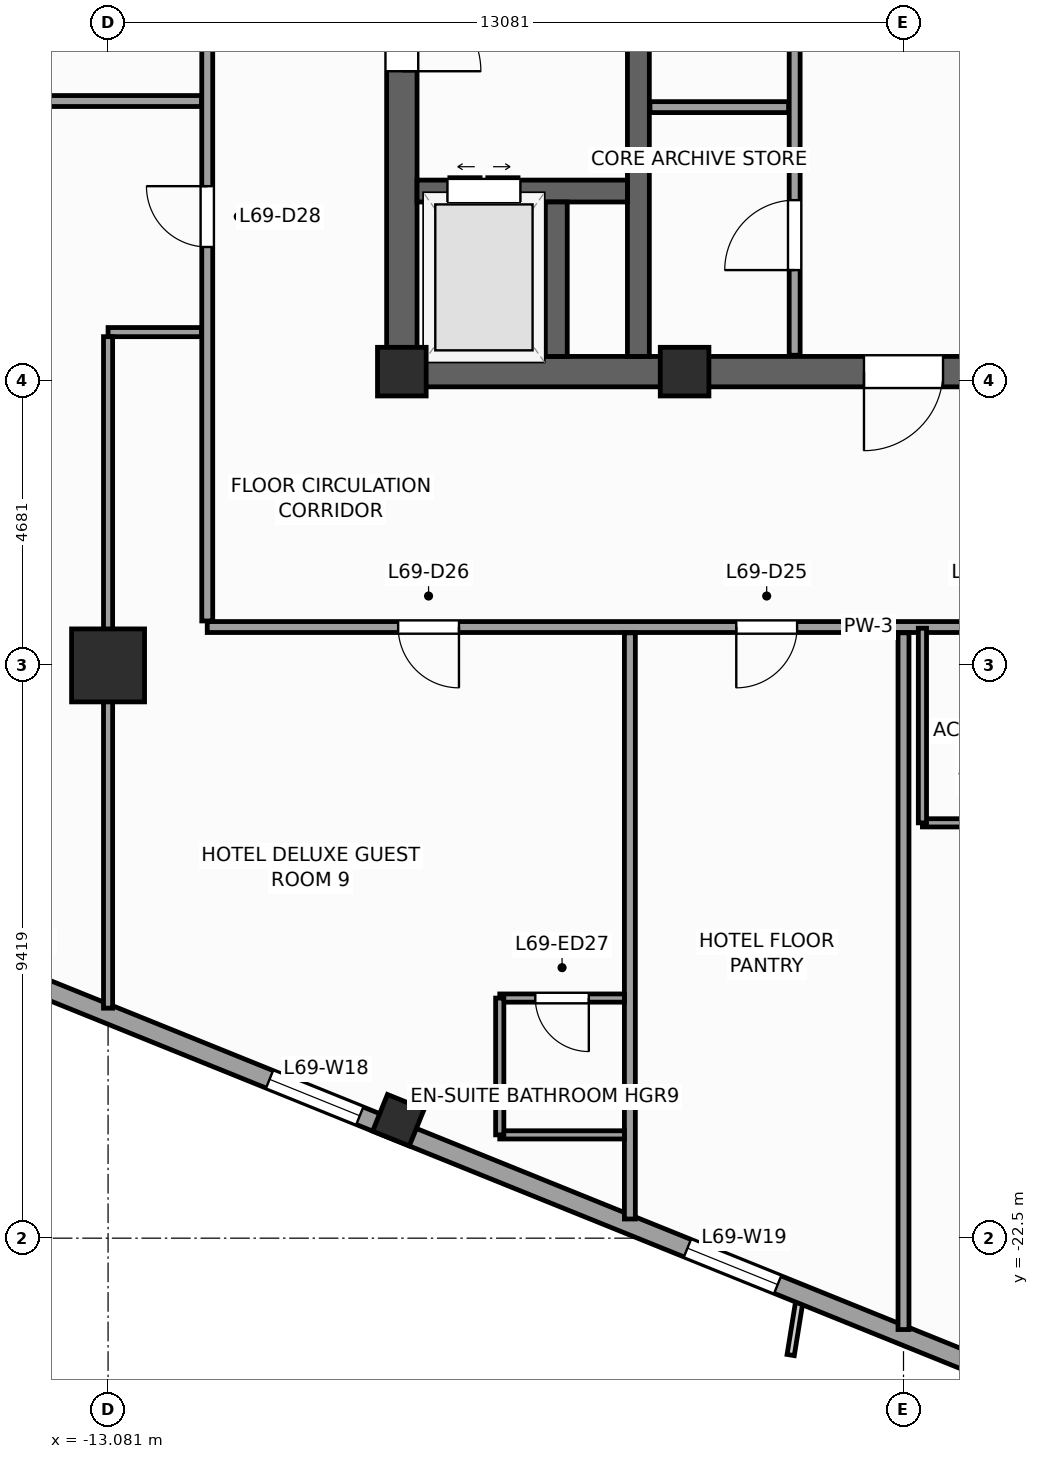
"""IFC4 building model, lengths in metres.
Left out: names, types, materials, properties, quantities, classifications, styles, units other than length and angle.
Written with IfcOpenShell. Run it as: python <this file> out.ifc"""

import sys

from ifc_helpers import new_model, si_unit, direction, frame, frame_2d, origin, origin_2d, place, context, subcontext, project, spatial, rectangle, extrude, source, transform, mapped, element, fill, save


model = new_model("IFC4")
c1 = context("Model", 3, precision=1e-05, world=origin(), true_north=direction((0.0, 1.0)))
c2 = subcontext(c1, "Body", "Model", "MODEL_VIEW")
j1 = project(units=[si_unit("LENGTHUNIT", "METRE"), si_unit("PLANEANGLEUNIT", "RADIAN")], contexts=[c1])
p1 = place(None, origin())
s1 = spatial("IfcSite", under=j1, at=p1, CompositionType="ELEMENT")
p2 = place(p1, origin())
s2 = spatial("IfcBuilding", under=s1, at=p2, CompositionType="ELEMENT")
p3 = place(p2, frame((0.0, 0.0, 283.2)))
s3 = spatial("IfcBuildingStorey", under=s2, at=p3, CompositionType="ELEMENT", Elevation=283.2)
p4 = place(p3, frame((-8.5, -8.25, 0.0), z_axis=(0.0, 0.0, 1.0), x_axis=(1.0, 0.0, 0.0)))
e1 = element("IfcWall", 1, at=p4, inside=s3, PredefinedType="SHEAR", context=c2, shape_type="SweptSolid", body=[
    extrude(rectangle(XDim=17.0, YDim=0.5, at=frame_2d((8.5, 0.0))), origin(), (0.0, 0.0, 1.0), 3.6),
])
p5 = place(p4, frame((7.85, 0.0, 0.0)))
e2 = element("IfcOpeningElement", 2, at=p5, cuts=e1, PredefinedType="OPENING", context=c2, shape_type="SweptSolid", body=[
    extrude(rectangle(XDim=1.3, YDim=2.2, at=frame_2d((0.65, 1.1))), frame((0.0, 0.26, 0.0), z_axis=(0.0, -1.0, 0.0), x_axis=(1.0, 0.0, 0.0)), (0.0, 0.0, 1.0), 0.52),
])
p6 = place(p3, frame((-8.25, -8.0, 0.0), z_axis=(0.0, 0.0, 1.0), x_axis=(0.0, 1.0, 0.0)))
e3 = element("IfcWall", 3, at=p6, inside=s3, PredefinedType="SHEAR", context=c2, shape_type="SweptSolid", body=[
    extrude(rectangle(XDim=16.0, YDim=0.5, at=frame_2d((8.0, 0.0))), origin(), (0.0, 0.0, 1.0), 3.6),
])
p7 = place(p6, frame((4.69, 0.0, 0.0)))
e4 = element("IfcOpeningElement", 4, at=p7, cuts=e3, PredefinedType="OPENING", context=c2, shape_type="SweptSolid", body=[
    extrude(rectangle(XDim=1.3, YDim=2.2, at=frame_2d((0.65, 1.1))), frame((0.0, 0.26, 0.0), z_axis=(0.0, -1.0, 0.0), x_axis=(1.0, 0.0, 0.0)), (0.0, 0.0, 1.0), 0.52),
])
p8 = place(p3, frame((-4.36, -8.0, 0.0), z_axis=(0.0, 0.0, 1.0), x_axis=(0.0, 1.0, 0.0)))
e5 = element("IfcWall", 5, at=p8, inside=s3, PredefinedType="SHEAR", context=c2, shape_type="SweptSolid", body=[
    extrude(rectangle(XDim=16.0, YDim=0.36, at=frame_2d((8.0, 0.0))), origin(), (0.0, 0.0, 1.0), 3.6),
])
p9 = place(p3, frame((-8.0, -5.28, 0.0), z_axis=(0.0, 0.0, 1.0), x_axis=(1.0, 0.0, 0.0)))
e6 = element("IfcWall", 6, at=p9, inside=s3, PredefinedType="SHEAR", context=c2, shape_type="SweptSolid", body=[
    extrude(rectangle(XDim=3.46, YDim=0.36, at=frame_2d((1.73, 0.0))), origin(), (0.0, 0.0, 1.0), 3.6),
])
p10 = place(p9, frame((0.5, 0.0, 0.0)))
e7 = element("IfcOpeningElement", 7, at=p10, cuts=e6, PredefinedType="OPENING", context=c2, shape_type="SweptSolid", body=[
    extrude(rectangle(XDim=1.2, YDim=2.25, at=frame_2d((0.6, 1.125))), frame((0.0, 0.19, 0.0), z_axis=(0.0, -1.0, 0.0), x_axis=(1.0, 0.0, 0.0)), (0.0, 0.0, 1.0), 0.38),
])
p11 = place(p3, frame((-5.71, -8.0, 0.0), z_axis=(0.0, 0.0, 1.0), x_axis=(0.0, 1.0, 0.0)))
e8 = element("IfcWall", 8, at=p11, inside=s3, PredefinedType="SHEAR", context=c2, shape_type="SweptSolid", body=[
    extrude(rectangle(XDim=2.54, YDim=0.36, at=frame_2d((1.27, 0.0))), origin(), (0.0, 0.0, 1.0), 3.6),
])
m1 = source(origin(), c2, "Body", "SweptSolid", [
    extrude(rectangle(XDim=0.8, YDim=0.8, at=origin_2d()), origin(), (0.0, 0.0, 1.0), 3.6),
])
for number, where, z_axis, x_axis in (
    (9, (-8.25, -8.25, 0.0), (0.0, 0.0, 1.0), (1.0, 0.0, 0.0)),
    (10, (-3.6, -8.25, 0.0), (0.0, 0.0, 1.0), (1.0, 0.0, 0.0)),
):
    element("IfcColumn", number, at=place(p3, frame(where, z_axis=z_axis, x_axis=x_axis)), inside=s3, PredefinedType="PILASTER", context=c2, shape_type="MappedRepresentation", body=[
        mapped(m1, transform((0.0, 0.0, 0.0), scale=1.0)),
    ])
m2 = source(origin(), c2, "Body", "SweptSolid", [
    extrude(rectangle(XDim=1.2, YDim=1.2, at=origin_2d()), origin(), (0.0, 0.0, 1.0), 3.6),
])
p12 = place(p3, frame((-13.081, -13.081, 0.0), z_axis=(0.0, 0.0, 1.0), x_axis=(1.0, 0.0, 0.0)))
e11 = element("IfcColumn", 11, at=p12, inside=s3, PredefinedType="COLUMN", context=c2, shape_type="MappedRepresentation", body=[
    mapped(m2, transform((0.0, 0.0, 0.0), scale=1.0)),
])
m3 = source(origin(), c2, "Body", "SweptSolid", [
    extrude(rectangle(XDim=0.65, YDim=0.65, at=origin_2d()), origin(), (0.0, 0.0, 1.0), 3.6),
])
p13 = place(p3, frame((-8.307, -20.56, 0.0), z_axis=(0.0, 0.0, 1.0), x_axis=(0.374606593416, 0.927183854567, 0.0)))
e12 = element("IfcColumn", 12, at=p13, inside=s3, PredefinedType="COLUMN", context=c2, shape_type="MappedRepresentation", body=[
    mapped(m3, transform((0.0, 0.0, 0.0), scale=1.0)),
])
p14 = place(p3, frame((-23.813, -14.479, 0.0), z_axis=(0.0, 0.0, 1.0), x_axis=(0.927182657188, -0.374609557019, 0.0)))
e13 = element("IfcWall", 13, at=p14, inside=s3, PredefinedType="STANDARD", context=c2, shape_type="SweptSolid", body=[
    extrude(rectangle(XDim=33.31, YDim=0.31, at=frame_2d((16.655, 0.0))), origin(), (0.0, 0.0, 1.0), 2.75),
])
p15 = place(p14, frame((3.197, 0.0, 0.47)))
e14 = element("IfcOpeningElement", 14, at=p15, cuts=e13, PredefinedType="OPENING", context=c2, shape_type="SweptSolid", body=[
    extrude(rectangle(XDim=1.6, YDim=2.1, at=frame_2d((0.8, 1.05))), frame((0.0, 0.165, 0.0), z_axis=(0.0, -1.0, 0.0), x_axis=(1.0, 0.0, 0.0)), (0.0, 0.0, 1.0), 0.33),
])
p16 = place(p14, frame((8.86, 0.0, 0.47)))
e15 = element("IfcOpeningElement", 15, at=p16, cuts=e13, PredefinedType="OPENING", context=c2, shape_type="SweptSolid", body=[
    extrude(rectangle(XDim=1.6, YDim=2.1, at=frame_2d((0.8, 1.05))), frame((0.0, 0.165, 0.0), z_axis=(0.0, -1.0, 0.0), x_axis=(1.0, 0.0, 0.0)), (0.0, 0.0, 1.0), 0.33),
])
p17 = place(p14, frame((14.439, 0.0, 0.47)))
e16 = element("IfcOpeningElement", 16, at=p17, cuts=e13, PredefinedType="OPENING", context=c2, shape_type="SweptSolid", body=[
    extrude(rectangle(XDim=1.6, YDim=2.1, at=frame_2d((0.8, 1.05))), frame((0.0, 0.165, 0.0), z_axis=(0.0, -1.0, 0.0), x_axis=(1.0, 0.0, 0.0)), (0.0, 0.0, 1.0), 0.33),
])
p18 = place(p14, frame((21.851, 0.0, 0.47)))
e17 = element("IfcOpeningElement", 17, at=p18, cuts=e13, PredefinedType="OPENING", context=c2, shape_type="SweptSolid", body=[
    extrude(rectangle(XDim=1.6, YDim=2.1, at=frame_2d((0.8, 1.05))), frame((0.0, 0.165, 0.0), z_axis=(0.0, -1.0, 0.0), x_axis=(1.0, 0.0, 0.0)), (0.0, 0.0, 1.0), 0.33),
])
p19 = place(p14, frame((27.847, 0.0, 0.47)))
e18 = element("IfcOpeningElement", 18, at=p19, cuts=e13, PredefinedType="OPENING", context=c2, shape_type="SweptSolid", body=[
    extrude(rectangle(XDim=1.6, YDim=2.1, at=frame_2d((0.8, 1.05))), frame((0.0, 0.165, 0.0), z_axis=(0.0, -1.0, 0.0), x_axis=(1.0, 0.0, 0.0)), (0.0, 0.0, 1.0), 0.33),
])
p20 = place(p3, frame((-1.79, -7.98, 0.0), z_axis=(0.0, 0.0, 1.0), x_axis=(0.0, 1.0, 0.0)))
e19 = element("IfcWall", 19, at=p20, inside=s3, PredefinedType="PARTITIONING", context=c2, shape_type="SweptSolid", body=[
    extrude(rectangle(XDim=12.38, YDim=0.18, at=frame_2d((6.19, 0.0))), origin(), (0.0, 0.0, 1.0), 3.35),
])
p21 = place(p20, frame((8.8, 0.0, 0.0)))
e20 = element("IfcOpeningElement", 20, at=p21, cuts=e19, PredefinedType="OPENING", context=c2, shape_type="SweptSolid", body=[
    extrude(rectangle(XDim=1.1, YDim=2.2, at=frame_2d((0.55, 1.1))), frame((0.0, 0.1, 0.0), z_axis=(0.0, -1.0, 0.0), x_axis=(1.0, 0.0, 0.0)), (0.0, 0.0, 1.0), 0.2),
])
p22 = place(p20, frame((10.86, 0.0, 0.0)))
e21 = element("IfcOpeningElement", 21, at=p22, cuts=e19, PredefinedType="OPENING", context=c2, shape_type="SweptSolid", body=[
    extrude(rectangle(XDim=1.1, YDim=2.2, at=frame_2d((0.55, 1.1))), frame((0.0, 0.1, 0.0), z_axis=(0.0, -1.0, 0.0), x_axis=(1.0, 0.0, 0.0)), (0.0, 0.0, 1.0), 0.2),
])
p23 = place(p20, frame((1.4, 0.0, 0.0)))
e22 = element("IfcOpeningElement", 22, at=p23, cuts=e19, PredefinedType="OPENING", context=c2, shape_type="SweptSolid", body=[
    extrude(rectangle(XDim=1.15, YDim=2.25, at=frame_2d((0.575, 1.125))), frame((0.0, 0.1, 0.0), z_axis=(0.0, -1.0, 0.0), x_axis=(1.0, 0.0, 0.0)), (0.0, 0.0, 1.0), 0.2),
])
p24 = place(p20, frame((5.6, 0.0, 0.0)))
e23 = element("IfcOpeningElement", 23, at=p24, cuts=e19, PredefinedType="OPENING", context=c2, shape_type="SweptSolid", body=[
    extrude(rectangle(XDim=1.15, YDim=2.25, at=frame_2d((0.575, 1.125))), frame((0.0, 0.1, 0.0), z_axis=(0.0, -1.0, 0.0), x_axis=(1.0, 0.0, 0.0)), (0.0, 0.0, 1.0), 0.2),
])
p25 = place(p3, frame((-4.17, -3.9, 0.0), z_axis=(0.0, 0.0, 1.0), x_axis=(1.0, 0.0, 0.0)))
e24 = element("IfcWall", 24, at=p25, inside=s3, PredefinedType="PARTITIONING", context=c2, shape_type="SweptSolid", body=[
    extrude(rectangle(XDim=2.28, YDim=0.18, at=frame_2d((1.14, 0.0))), origin(), (0.0, 0.0, 1.0), 3.35),
])
p26 = place(p3, frame((-11.45, -12.45, 0.0), z_axis=(0.0, 0.0, 1.0), x_axis=(1.0, 0.0, 0.0)))
e25 = element("IfcWall", 25, at=p26, inside=s3, PredefinedType="PARTITIONING", context=c2, shape_type="SweptSolid", body=[
    extrude(rectangle(XDim=21.75, YDim=0.18, at=frame_2d((10.875, 0.0))), origin(), (0.0, 0.0, 1.0), 3.35),
])
p27 = place(p26, frame((12.436, 0.0, 0.0)))
e26 = element("IfcOpeningElement", 26, at=p27, cuts=e25, PredefinedType="OPENING", context=c2, shape_type="SweptSolid", body=[
    extrude(rectangle(XDim=0.95, YDim=2.1, at=frame_2d((0.475, 1.05))), frame((0.0, 0.1, 0.0), z_axis=(0.0, -1.0, 0.0), x_axis=(1.0, 0.0, 0.0)), (0.0, 0.0, 1.0), 0.2),
])
p28 = place(p26, frame((18.186, 0.0, 0.0)))
e27 = element("IfcOpeningElement", 27, at=p28, cuts=e25, PredefinedType="OPENING", context=c2, shape_type="SweptSolid", body=[
    extrude(rectangle(XDim=1.0, YDim=2.15, at=frame_2d((0.5, 1.075))), frame((0.0, 0.1, 0.0), z_axis=(0.0, -1.0, 0.0), x_axis=(1.0, 0.0, 0.0)), (0.0, 0.0, 1.0), 0.2),
])
p29 = place(p26, frame((14.5, 0.0, 0.0)))
e28 = element("IfcOpeningElement", 28, at=p29, cuts=e25, PredefinedType="OPENING", context=c2, shape_type="SweptSolid", body=[
    extrude(rectangle(XDim=1.0, YDim=2.15, at=frame_2d((0.5, 1.075))), frame((0.0, 0.1, 0.0), z_axis=(0.0, -1.0, 0.0), x_axis=(1.0, 0.0, 0.0)), (0.0, 0.0, 1.0), 0.2),
])
p30 = place(p26, frame((8.7, 0.0, 0.0)))
e29 = element("IfcOpeningElement", 29, at=p30, cuts=e25, PredefinedType="OPENING", context=c2, shape_type="SweptSolid", body=[
    extrude(rectangle(XDim=1.0, YDim=2.15, at=frame_2d((0.5, 1.075))), frame((0.0, 0.1, 0.0), z_axis=(0.0, -1.0, 0.0), x_axis=(1.0, 0.0, 0.0)), (0.0, 0.0, 1.0), 0.2),
])
p31 = place(p26, frame((3.139, 0.0, 0.0)))
e30 = element("IfcOpeningElement", 30, at=p31, cuts=e25, PredefinedType="OPENING", context=c2, shape_type="SweptSolid", body=[
    extrude(rectangle(XDim=1.0, YDim=2.15, at=frame_2d((0.5, 1.075))), frame((0.0, 0.1, 0.0), z_axis=(0.0, -1.0, 0.0), x_axis=(1.0, 0.0, 0.0)), (0.0, 0.0, 1.0), 0.2),
])
p32 = place(p3, frame((-11.45, -12.35, 0.0), z_axis=(0.0, 0.0, 1.0), x_axis=(0.0, 1.0, 0.0)))
e31 = element("IfcWall", 31, at=p32, inside=s3, PredefinedType="PARTITIONING", context=c2, shape_type="SweptSolid", body=[
    extrude(rectangle(XDim=23.7, YDim=0.18, at=frame_2d((11.85, 0.0))), origin(), (0.0, 0.0, 1.0), 3.35),
])
p33 = place(p32, frame((13.75, 0.0, 0.0)))
e32 = element("IfcOpeningElement", 32, at=p33, cuts=e31, PredefinedType="OPENING", context=c2, shape_type="SweptSolid", body=[
    extrude(rectangle(XDim=1.0, YDim=2.15, at=frame_2d((0.5, 1.075))), frame((0.0, 0.1, 0.0), z_axis=(0.0, -1.0, 0.0), x_axis=(1.0, 0.0, 0.0)), (0.0, 0.0, 1.0), 0.2),
])
p34 = place(p32, frame((17.55, 0.0, 0.0)))
e33 = element("IfcOpeningElement", 33, at=p34, cuts=e31, PredefinedType="OPENING", context=c2, shape_type="SweptSolid", body=[
    extrude(rectangle(XDim=1.0, YDim=2.15, at=frame_2d((0.5, 1.075))), frame((0.0, 0.1, 0.0), z_axis=(0.0, -1.0, 0.0), x_axis=(1.0, 0.0, 0.0)), (0.0, 0.0, 1.0), 0.2),
])
p35 = place(p32, frame((6.15, 0.0, 0.0)))
e34 = element("IfcOpeningElement", 34, at=p35, cuts=e31, PredefinedType="OPENING", context=c2, shape_type="SweptSolid", body=[
    extrude(rectangle(XDim=1.0, YDim=2.15, at=frame_2d((0.5, 1.075))), frame((0.0, 0.1, 0.0), z_axis=(0.0, -1.0, 0.0), x_axis=(1.0, 0.0, 0.0)), (0.0, 0.0, 1.0), 0.2),
])
p36 = place(p32, frame((9.95, 0.0, 0.0)))
e35 = element("IfcOpeningElement", 35, at=p36, cuts=e31, PredefinedType="OPENING", context=c2, shape_type="SweptSolid", body=[
    extrude(rectangle(XDim=1.0, YDim=2.15, at=frame_2d((0.5, 1.075))), frame((0.0, 0.1, 0.0), z_axis=(0.0, -1.0, 0.0), x_axis=(1.0, 0.0, 0.0)), (0.0, 0.0, 1.0), 0.2),
])
p37 = place(p3, frame((0.0, -12.545, 0.0), z_axis=(0.0, 0.0, 1.0), x_axis=(0.0, -1.0, 0.0)))
e36 = element("IfcWall", 36, at=p37, inside=s3, PredefinedType="PARTITIONING", context=c2, shape_type="SweptSolid", body=[
    extrude(rectangle(XDim=11.458, YDim=0.18, at=frame_2d((5.729, 0.0))), origin(), (0.0, 0.0, 1.0), 3.02),
])
p38 = place(p3, frame((-4.5, -12.545, 0.0), z_axis=(0.0, 0.0, 1.0), x_axis=(0.0, -1.0, 0.0)))
e37 = element("IfcWall", 37, at=p38, inside=s3, PredefinedType="PARTITIONING", context=c2, shape_type="SweptSolid", body=[
    extrude(rectangle(XDim=9.64, YDim=0.18, at=frame_2d((4.82, 0.0))), origin(), (0.0, 0.0, 1.0), 3.02),
])
p39 = place(p3, frame((-11.545, -3.8, 0.0), z_axis=(0.0, 0.0, 1.0), x_axis=(-1.0, 0.0, 0.0)))
e38 = element("IfcWall", 38, at=p39, inside=s3, PredefinedType="PARTITIONING", context=c2, shape_type="SweptSolid", body=[
    extrude(rectangle(XDim=13.993, YDim=0.18, at=frame_2d((6.997, 0.0))), origin(), (0.0, 0.0, 1.0), 3.35),
])
p40 = place(p3, frame((-11.545, -7.6, 0.0), z_axis=(0.0, 0.0, 1.0), x_axis=(-1.0, 0.0, 0.0)))
e39 = element("IfcWall", 39, at=p40, inside=s3, PredefinedType="PARTITIONING", context=c2, shape_type="SweptSolid", body=[
    extrude(rectangle(XDim=1.536, YDim=0.15, at=frame_2d((0.768, 0.0))), origin(), (0.0, 0.0, 1.0), 3.35),
])
p41 = place(p3, frame((-13.081, -7.675, 0.0), z_axis=(0.0, 0.0, 1.0), x_axis=(0.0, -1.0, 0.0)))
e40 = element("IfcWall", 40, at=p41, inside=s3, PredefinedType="PARTITIONING", context=c2, shape_type="SweptSolid", body=[
    extrude(rectangle(XDim=11.043, YDim=0.15, at=frame_2d((5.521, 0.0))), origin(), (0.0, 0.0, 1.0), 2.45),
])
p42 = place(p3, frame((0.311, -15.67, 0.0), z_axis=(0.0, 0.0, 1.0), x_axis=(1.0, 0.0, 0.0)))
e41 = element("IfcWall", 41, at=p42, inside=s3, PredefinedType="PARTITIONING", context=c2, shape_type="SweptSolid", body=[
    extrude(rectangle(XDim=2.3, YDim=0.135, at=frame_2d((1.15, 0.0))), origin(), (0.0, 0.0, 1.0), 3.35),
])
p43 = place(p3, frame((0.311, -15.67, 0.0), z_axis=(0.0, 0.0, 1.0), x_axis=(0.0, 1.0, 0.0)))
e42 = element("IfcWall", 42, at=p43, inside=s3, PredefinedType="PARTITIONING", context=c2, shape_type="SweptSolid", body=[
    extrude(rectangle(XDim=3.2, YDim=0.135, at=frame_2d((1.6, 0.0))), origin(), (0.0, 0.0, 1.0), 3.35),
])
p44 = place(p3, frame((-6.64, -20.801, 0.0), z_axis=(0.0, 0.0, 1.0), x_axis=(1.0, 0.0, 0.0)))
e43 = element("IfcWall", 43, at=p44, inside=s3, PredefinedType="PARTITIONING", context=c2, shape_type="SweptSolid", body=[
    extrude(rectangle(XDim=2.05, YDim=0.135, at=frame_2d((1.025, 0.0))), origin(), (0.0, 0.0, 1.0), 3.35),
])
p45 = place(p3, frame((-6.64, -18.551, 0.0), z_axis=(0.0, 0.0, 1.0), x_axis=(1.0, 0.0, 0.0)))
e44 = element("IfcWall", 44, at=p45, inside=s3, PredefinedType="PARTITIONING", context=c2, shape_type="SweptSolid", body=[
    extrude(rectangle(XDim=2.05, YDim=0.135, at=frame_2d((1.025, 0.0))), origin(), (0.0, 0.0, 1.0), 2.95),
])
p46 = place(p45, frame((0.585, 0.0, 0.0)))
e45 = element("IfcOpeningElement", 45, at=p46, cuts=e44, PredefinedType="OPENING", context=c2, shape_type="SweptSolid", body=[
    extrude(rectangle(XDim=0.88, YDim=2.1, at=frame_2d((0.44, 1.05))), frame((0.0, 0.078, 0.0), z_axis=(0.0, -1.0, 0.0), x_axis=(1.0, 0.0, 0.0)), (0.0, 0.0, 1.0), 0.155),
])
p47 = place(p3, frame((-6.64, -20.801, 0.0), z_axis=(0.0, 0.0, 1.0), x_axis=(0.0, 1.0, 0.0)))
e46 = element("IfcWall", 46, at=p47, inside=s3, PredefinedType="PARTITIONING", context=c2, shape_type="SweptSolid", body=[
    extrude(rectangle(XDim=2.25, YDim=0.135, at=frame_2d((1.125, 0.0))), origin(), (0.0, 0.0, 1.0), 3.35),
])
m4 = source(origin(), c2, "Body", "SweptSolid", [
    extrude(rectangle(XDim=1.6, YDim=2.1, at=frame_2d((0.8, 1.05))), frame((0.0, 0.03, 0.0), z_axis=(0.0, -1.0, 0.0), x_axis=(1.0, 0.0, 0.0)), (0.0, 0.0, 1.0), 0.06),
])
p48 = place(p17, origin())
e47 = element("IfcWindow", 47, at=p48, inside=s3, PartitioningType="SINGLE_PANEL", PredefinedType="WINDOW", context=c2, shape_type="MappedRepresentation", body=[
    mapped(m4, transform((0.0, 0.0, 0.0), scale=1.0)),
])
fill(e16, e47)
p49 = place(p18, origin())
e48 = element("IfcWindow", 48, at=p49, inside=s3, PartitioningType="SINGLE_PANEL", PredefinedType="WINDOW", context=c2, shape_type="MappedRepresentation", body=[
    mapped(m4, transform((0.0, 0.0, 0.0), scale=1.0)),
])
fill(e17, e48)
m5 = source(origin(), c2, "Body", "SweptSolid", [
    extrude(rectangle(XDim=1.3, YDim=2.2, at=frame_2d((0.65, 1.1))), frame((0.0, 0.025, 0.0), z_axis=(0.0, -1.0, 0.0), x_axis=(1.0, 0.0, 0.0)), (0.0, 0.0, 1.0), 0.05),
])
p50 = place(p7, frame((1.3, 0.0, 0.0), z_axis=(0.0, 0.0, 1.0), x_axis=(-1.0, 0.0, 0.0)))
e49 = element("IfcDoor", 49, at=p50, inside=s3, OperationType="SINGLE_SWING_LEFT", PredefinedType="DOOR", context=c2, shape_type="MappedRepresentation", body=[
    mapped(m5, transform((0.0, 0.0, 0.0), scale=1.0)),
])
fill(e4, e49)
p51 = place(p5, frame((1.3, 0.0, 0.0), z_axis=(0.0, 0.0, 1.0), x_axis=(-1.0, 0.0, 0.0)))
e50 = element("IfcDoor", 50, at=p51, inside=s3, OperationType="SINGLE_SWING_LEFT", PredefinedType="DOOR", context=c2, shape_type="MappedRepresentation", body=[
    mapped(m5, transform((0.0, 0.0, 0.0), scale=1.0)),
])
fill(e2, e50)
m6 = source(origin(), c2, "Body", "SweptSolid", [
    extrude(rectangle(XDim=1.2, YDim=2.25, at=frame_2d((0.6, 1.125))), frame((0.0, 0.025, 0.0), z_axis=(0.0, -1.0, 0.0), x_axis=(1.0, 0.0, 0.0)), (0.0, 0.0, 1.0), 0.05),
])
p52 = place(p10, origin())
e51 = element("IfcDoor", 51, at=p52, inside=s3, OperationType="DOUBLE_DOOR_SLIDING", PredefinedType="DOOR", context=c2, shape_type="MappedRepresentation", body=[
    mapped(m6, transform((0.0, 0.0, 0.0), scale=1.0)),
])
fill(e7, e51)
m7 = source(origin(), c2, "Body", "SweptSolid", [
    extrude(rectangle(XDim=1.15, YDim=2.25, at=frame_2d((0.575, 1.125))), frame((0.0, 0.025, 0.0), z_axis=(0.0, -1.0, 0.0), x_axis=(1.0, 0.0, 0.0)), (0.0, 0.0, 1.0), 0.05),
])
p53 = place(p23, origin())
e52 = element("IfcDoor", 52, at=p53, inside=s3, OperationType="SINGLE_SWING_LEFT", PredefinedType="DOOR", context=c2, shape_type="MappedRepresentation", body=[
    mapped(m7, transform((0.0, 0.0, 0.0), scale=1.0)),
])
fill(e22, e52)
m8 = source(origin(), c2, "Body", "SweptSolid", [
    extrude(rectangle(XDim=1.0, YDim=2.15, at=frame_2d((0.5, 1.075))), frame((0.0, 0.025, 0.0), z_axis=(0.0, -1.0, 0.0), x_axis=(1.0, 0.0, 0.0)), (0.0, 0.0, 1.0), 0.05),
])
p54 = place(p30, frame((1.0, 0.0, 0.0), z_axis=(0.0, 0.0, 1.0), x_axis=(-1.0, 0.0, 0.0)))
e53 = element("IfcDoor", 53, at=p54, inside=s3, OperationType="SINGLE_SWING_LEFT", PredefinedType="DOOR", context=c2, shape_type="MappedRepresentation", body=[
    mapped(m8, transform((0.0, 0.0, 0.0), scale=1.0)),
])
fill(e29, e53)
p55 = place(p31, frame((1.0, 0.0, 0.0), z_axis=(0.0, 0.0, 1.0), x_axis=(-1.0, 0.0, 0.0)))
e54 = element("IfcDoor", 54, at=p55, inside=s3, OperationType="SINGLE_SWING_RIGHT", PredefinedType="DOOR", context=c2, shape_type="MappedRepresentation", body=[
    mapped(m8, transform((0.0, 0.0, 0.0), scale=1.0)),
])
fill(e30, e54)
m9 = source(origin(), c2, "Body", "SweptSolid", [
    extrude(rectangle(XDim=0.88, YDim=2.1, at=frame_2d((0.44, 1.05))), frame((0.0, 0.025, 0.0), z_axis=(0.0, -1.0, 0.0), x_axis=(1.0, 0.0, 0.0)), (0.0, 0.0, 1.0), 0.05),
])
p56 = place(p46, frame((0.88, 0.0, 0.0), z_axis=(0.0, 0.0, 1.0), x_axis=(-1.0, 0.0, 0.0)))
e55 = element("IfcDoor", 55, at=p56, inside=s3, OperationType="SINGLE_SWING_RIGHT", PredefinedType="DOOR", context=c2, shape_type="MappedRepresentation", body=[
    mapped(m9, transform((0.0, 0.0, 0.0), scale=1.0)),
])
fill(e45, e55)
p57 = place(p35, origin())
e56 = element("IfcDoor", 56, at=p57, inside=s3, OperationType="SINGLE_SWING_RIGHT", PredefinedType="DOOR", context=c2, shape_type="MappedRepresentation", body=[
    mapped(m8, transform((0.0, 0.0, 0.0), scale=1.0)),
])
fill(e34, e56)
save(model, sys.argv[1])
